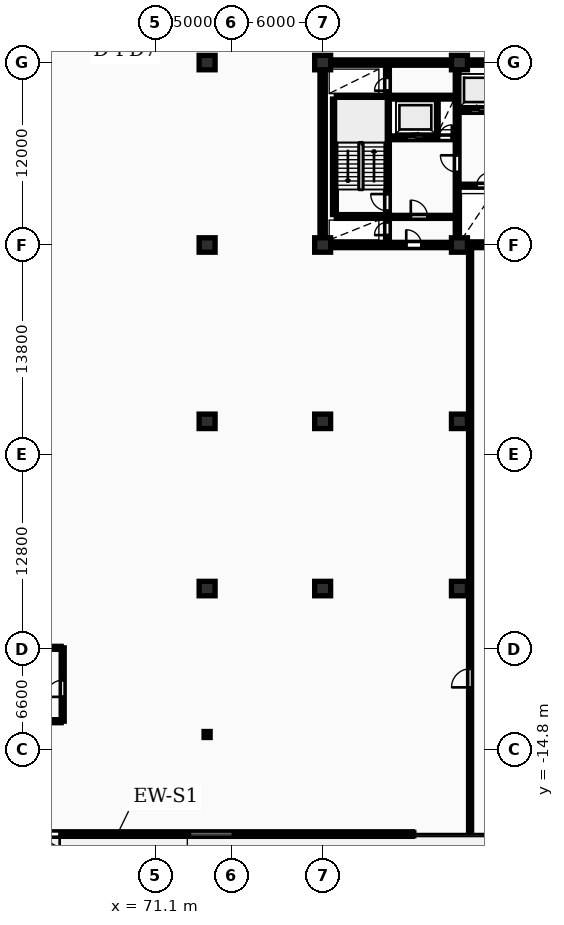
"""IFC4 building model, lengths in metres.
Left out: names, types, materials, properties, quantities, classifications, styles, units other than length and angle.
Written with IfcOpenShell. Run it as: python <this file> out.ifc"""

import sys

from ifc_helpers import new_model, si_unit, direction, frame, frame_2d, origin, origin_2d, place, context, subcontext, project, spatial, rectangle, i_section, extrude, element, fill, save


model = new_model("IFC4")
c1 = context("Model", 3, precision=1e-05, world=origin(), true_north=direction((0.0, 1.0)))
c2 = subcontext(c1, "Body", "Model", "MODEL_VIEW")
j1 = project(units=[si_unit("LENGTHUNIT", "METRE"), si_unit("PLANEANGLEUNIT", "RADIAN")], contexts=[c1])
p1 = place(None, origin())
s1 = spatial("IfcSite", under=j1, at=p1, CompositionType="ELEMENT")
p2 = place(p1, origin())
s2 = spatial("IfcBuilding", under=s1, at=p2, CompositionType="ELEMENT")
p3 = place(p2, frame((0.0, 0.0, 10.0)))
s3 = spatial("IfcBuildingStorey", under=s2, at=p3, CompositionType="ELEMENT", Elevation=10.0)
for number, where, z_axis, x_axis in (
    (1, (74.5, -4.2, 0.0), (0.0, 0.0, 1.0), (1.0, 0.0, 0.0)),
    (2, (74.5, 6.8, 0.0), (0.0, 0.0, 1.0), (1.0, 0.0, 0.0)),
    (3, (74.5, 18.4, 0.0), (0.0, 0.0, 1.0), (1.0, 0.0, 0.0)),
    (4, (74.5, 30.4, 0.0), (0.0, 0.0, 1.0), (1.0, 0.0, 0.0)),
    (5, (82.1, -4.2, 0.0), (0.0, 0.0, 1.0), (1.0, 0.0, 0.0)),
    (6, (82.1, 6.8, 0.0), (0.0, 0.0, 1.0), (1.0, 0.0, 0.0)),
    (7, (82.1, 18.4, 0.0), (0.0, 0.0, 1.0), (1.0, 0.0, 0.0)),
    (8, (82.1, 30.4, 0.0), (0.0, 0.0, 1.0), (1.0, 0.0, 0.0)),
    (9, (91.1, -4.2, 0.0), (0.0, 0.0, 1.0), (1.0, 0.0, 0.0)),
    (10, (91.1, 6.8, 0.0), (0.0, 0.0, 1.0), (1.0, 0.0, 0.0)),
    (11, (91.1, 18.4, 0.0), (0.0, 0.0, 1.0), (1.0, 0.0, 0.0)),
    (12, (91.1, 30.4, 0.0), (0.0, 0.0, 1.0), (1.0, 0.0, 0.0)),
):
    element("IfcColumn", number, at=place(p3, frame(where, z_axis=z_axis, x_axis=x_axis)), inside=s3, PredefinedType="COLUMN", context=c2, shape_type="SweptSolid", body=[
        extrude(rectangle(XDim=1.05, YDim=0.95, at=origin_2d()), origin(), (0.0, 0.0, 1.0), 4.5),
    ])
p4 = place(p3, frame((74.5, -13.8, 0.0), z_axis=(0.0, 0.0, 1.0), x_axis=(1.0, 0.0, 0.0)))
e13 = element("IfcColumn", 13, at=p4, inside=s3, PredefinedType="COLUMN", context=c2, shape_type="SweptSolid", body=[
    extrude(i_section(OverallWidth=0.399, OverallDepth=0.394, WebThickness=0.023, FlangeThickness=0.037, FilletRadius=0.015, at=origin_2d()), origin(), (0.0, 0.0, 1.0), 4.5),
])
p5 = place(p3, frame((49.2, -20.35, 0.0), z_axis=(0.0, 0.0, 1.0), x_axis=(1.0, 0.0, 0.0)))
e14 = element("IfcWall", 14, at=p5, inside=s3, PredefinedType="STANDARD", context=c2, shape_type="SweptSolid", body=[
    extrude(rectangle(XDim=38.8, YDim=0.3, at=frame_2d((19.4, 0.0))), origin(), (0.0, 0.0, 1.0), 4.2),
])
p6 = place(p5, frame((14.0, 0.0, 0.0)))
e15 = element("IfcOpeningElement", 15, at=p6, cuts=e14, PredefinedType="OPENING", context=c2, shape_type="SweptSolid", body=[
    extrude(rectangle(XDim=1.6, YDim=2.2, at=frame_2d((0.8, 1.1))), frame((0.0, 0.16, 0.0), z_axis=(0.0, -1.0, 0.0), x_axis=(1.0, 0.0, 0.0)), (0.0, 0.0, 1.0), 0.32),
])
p7 = place(p5, frame((24.0, 0.0, 0.9)))
e16 = element("IfcOpeningElement", 16, at=p7, cuts=e14, PredefinedType="OPENING", context=c2, shape_type="SweptSolid", body=[
    extrude(rectangle(XDim=3.0, YDim=2.6, at=frame_2d((1.5, 1.3))), frame((0.0, 0.16, 0.0), z_axis=(0.0, -1.0, 0.0), x_axis=(1.0, 0.0, 0.0)), (0.0, 0.0, 1.0), 0.32),
])
p8 = place(p3, frame((81.925, 30.4, 0.0), z_axis=(0.0, 0.0, 1.0), x_axis=(1.0, 0.0, 0.0)))
e17 = element("IfcWall", 17, at=p8, inside=s3, PredefinedType="SHEAR", context=c2, shape_type="SweptSolid", body=[
    extrude(rectangle(XDim=36.265, YDim=0.35, at=frame_2d((18.132, 0.0))), origin(), (0.0, 0.0, 1.0), 4.5),
])
p9 = place(p3, frame((82.1, 18.575, 0.0), z_axis=(0.0, 0.0, 1.0), x_axis=(0.0, 1.0, 0.0)))
e18 = element("IfcWall", 18, at=p9, inside=s3, PredefinedType="SHEAR", context=c2, shape_type="SweptSolid", body=[
    extrude(rectangle(XDim=11.65, YDim=0.35, at=frame_2d((5.825, 0.0))), origin(), (0.0, 0.0, 1.0), 4.5),
])
p10 = place(p3, frame((81.925, 18.4, 0.0), z_axis=(0.0, 0.0, 1.0), x_axis=(1.0, 0.0, 0.0)))
e19 = element("IfcWall", 19, at=p10, inside=s3, PredefinedType="SHEAR", context=c2, shape_type="SweptSolid", body=[
    extrude(rectangle(XDim=36.265, YDim=0.35, at=frame_2d((18.132, 0.0))), origin(), (0.0, 0.0, 1.0), 4.5),
])
p11 = place(p10, frame((5.675, 0.0, 0.0)))
e20 = element("IfcOpeningElement", 20, at=p11, cuts=e19, PredefinedType="OPENING", context=c2, shape_type="SweptSolid", body=[
    extrude(rectangle(XDim=1.0, YDim=2.15, at=frame_2d((0.5, 1.075))), frame((0.0, 0.185, 0.0), z_axis=(0.0, -1.0, 0.0), x_axis=(1.0, 0.0, 0.0)), (0.0, 0.0, 1.0), 0.37),
])
p12 = place(p10, frame((21.925, 0.0, 0.0)))
e21 = element("IfcOpeningElement", 21, at=p12, cuts=e19, PredefinedType="OPENING", context=c2, shape_type="SweptSolid", body=[
    extrude(rectangle(XDim=1.5, YDim=2.2, at=frame_2d((0.75, 1.1))), frame((0.0, 0.185, 0.0), z_axis=(0.0, -1.0, 0.0), x_axis=(1.0, 0.0, 0.0)), (0.0, 0.0, 1.0), 0.37),
])
p13 = place(p10, frame((29.875, 0.0, 0.0)))
e22 = element("IfcOpeningElement", 22, at=p13, cuts=e19, PredefinedType="OPENING", context=c2, shape_type="SweptSolid", body=[
    extrude(rectangle(XDim=1.0, YDim=2.15, at=frame_2d((0.5, 1.075))), frame((0.0, 0.185, 0.0), z_axis=(0.0, -1.0, 0.0), x_axis=(1.0, 0.0, 0.0)), (0.0, 0.0, 1.0), 0.37),
])
p14 = place(p3, frame((82.875, 20.4, 0.0), z_axis=(0.0, 0.0, 1.0), x_axis=(0.0, 1.0, 0.0)))
e23 = element("IfcWall", 23, at=p14, inside=s3, PredefinedType="SHEAR", context=c2, shape_type="SweptSolid", body=[
    extrude(rectangle(XDim=7.6, YDim=0.25, at=frame_2d((3.8, 0.0))), origin(), (0.0, 0.0, 1.0), 4.5),
])
p15 = place(p3, frame((86.365, 18.6, 0.0), z_axis=(0.0, 0.0, 1.0), x_axis=(0.0, 1.0, 0.0)))
e24 = element("IfcWall", 24, at=p15, inside=s3, PredefinedType="SHEAR", context=c2, shape_type="SweptSolid", body=[
    extrude(rectangle(XDim=11.6, YDim=0.25, at=frame_2d((5.8, 0.0))), origin(), (0.0, 0.0, 1.0), 4.5),
])
p16 = place(p15, frame((0.45, 0.0, 0.0)))
e25 = element("IfcOpeningElement", 25, at=p16, cuts=e24, PredefinedType="OPENING", context=c2, shape_type="SweptSolid", body=[
    extrude(rectangle(XDim=0.85, YDim=2.05, at=frame_2d((0.425, 1.025))), frame((0.0, 0.135, 0.0), z_axis=(0.0, -1.0, 0.0), x_axis=(1.0, 0.0, 0.0)), (0.0, 0.0, 1.0), 0.27),
])
p17 = place(p15, frame((2.05, 0.0, 0.0)))
e26 = element("IfcOpeningElement", 26, at=p17, cuts=e24, PredefinedType="OPENING", context=c2, shape_type="SweptSolid", body=[
    extrude(rectangle(XDim=1.1, YDim=2.1, at=frame_2d((0.55, 1.05))), frame((0.0, 0.135, 0.0), z_axis=(0.0, -1.0, 0.0), x_axis=(1.0, 0.0, 0.0)), (0.0, 0.0, 1.0), 0.27),
])
p18 = place(p15, frame((9.95, 0.0, 0.0)))
e27 = element("IfcOpeningElement", 27, at=p18, cuts=e24, PredefinedType="OPENING", context=c2, shape_type="SweptSolid", body=[
    extrude(rectangle(XDim=0.85, YDim=2.05, at=frame_2d((0.425, 1.025))), frame((0.0, 0.135, 0.0), z_axis=(0.0, -1.0, 0.0), x_axis=(1.0, 0.0, 0.0)), (0.0, 0.0, 1.0), 0.27),
])
p19 = place(p3, frame((83.0, 20.275, 0.0), z_axis=(0.0, 0.0, 1.0), x_axis=(1.0, 0.0, 0.0)))
e28 = element("IfcWall", 28, at=p19, inside=s3, PredefinedType="SHEAR", context=c2, shape_type="SweptSolid", body=[
    extrude(rectangle(XDim=3.24, YDim=0.25, at=frame_2d((1.62, 0.0))), origin(), (0.0, 0.0, 1.0), 4.5),
])
p20 = place(p3, frame((83.0, 28.125, 0.0), z_axis=(0.0, 0.0, 1.0), x_axis=(1.0, 0.0, 0.0)))
e29 = element("IfcWall", 29, at=p20, inside=s3, PredefinedType="SHEAR", context=c2, shape_type="SweptSolid", body=[
    extrude(rectangle(XDim=7.82, YDim=0.25, at=frame_2d((3.91, 0.0))), origin(), (0.0, 0.0, 1.0), 4.5),
])
p21 = place(p3, frame((86.5, 25.45, 0.0), z_axis=(0.0, 0.0, 1.0), x_axis=(1.0, 0.0, 0.0)))
e30 = element("IfcWall", 30, at=p21, inside=s3, PredefinedType="SHEAR", context=c2, shape_type="SweptSolid", body=[
    extrude(rectangle(XDim=4.32, YDim=0.25, at=frame_2d((2.16, 0.0))), origin(), (0.0, 0.0, 1.0), 4.5),
])
p22 = place(p21, frame((1.14, 0.0, 0.0)))
e31 = element("IfcOpeningElement", 31, at=p22, cuts=e30, PredefinedType="OPENING", context=c2, shape_type="SweptSolid", body=[
    extrude(rectangle(XDim=1.12, YDim=2.12, at=frame_2d((0.56, 1.06))), frame((0.0, 0.135, 0.0), z_axis=(0.0, -1.0, 0.0), x_axis=(1.0, 0.0, 0.0)), (0.0, 0.0, 1.0), 0.27),
])
p23 = place(p21, frame((3.25, 0.0, 0.0)))
e32 = element("IfcOpeningElement", 32, at=p23, cuts=e30, PredefinedType="OPENING", context=c2, shape_type="SweptSolid", body=[
    extrude(rectangle(XDim=0.85, YDim=2.05, at=frame_2d((0.425, 1.025))), frame((0.0, 0.135, 0.0), z_axis=(0.0, -1.0, 0.0), x_axis=(1.0, 0.0, 0.0)), (0.0, 0.0, 1.0), 0.27),
])
p24 = place(p3, frame((89.6, 25.58, 0.0), z_axis=(0.0, 0.0, 1.0), x_axis=(0.0, 1.0, 0.0)))
e33 = element("IfcWall", 33, at=p24, inside=s3, PredefinedType="PARTITIONING", context=c2, shape_type="SweptSolid", body=[
    extrude(rectangle(XDim=2.42, YDim=0.2, at=frame_2d((1.21, 0.0))), origin(), (0.0, 0.0, 1.0), 4.2),
])
p25 = place(p3, frame((86.5, 20.25, 0.0), z_axis=(0.0, 0.0, 1.0), x_axis=(1.0, 0.0, 0.0)))
e34 = element("IfcWall", 34, at=p25, inside=s3, PredefinedType="PARTITIONING", context=c2, shape_type="SweptSolid", body=[
    extrude(rectangle(XDim=4.32, YDim=0.2, at=frame_2d((2.16, 0.0))), origin(), (0.0, 0.0, 1.0), 4.2),
])
p26 = place(p25, frame((1.4, 0.0, 0.0)))
e35 = element("IfcOpeningElement", 35, at=p26, cuts=e34, PredefinedType="OPENING", context=c2, shape_type="SweptSolid", body=[
    extrude(rectangle(XDim=1.1, YDim=2.1, at=frame_2d((0.55, 1.05))), frame((0.0, 0.11, 0.0), z_axis=(0.0, -1.0, 0.0), x_axis=(1.0, 0.0, 0.0)), (0.0, 0.0, 1.0), 0.22),
])
p27 = place(p3, frame((90.95, 18.6, 0.0), z_axis=(0.0, 0.0, 1.0), x_axis=(0.0, 1.0, 0.0)))
e36 = element("IfcWall", 36, at=p27, inside=s3, PredefinedType="SHEAR", context=c2, shape_type="SweptSolid", body=[
    extrude(rectangle(XDim=11.6, YDim=0.25, at=frame_2d((5.8, 0.0))), origin(), (0.0, 0.0, 1.0), 4.5),
])
p28 = place(p27, frame((4.6, 0.0, 0.0)))
e37 = element("IfcOpeningElement", 37, at=p28, cuts=e36, PredefinedType="OPENING", context=c2, shape_type="SweptSolid", body=[
    extrude(rectangle(XDim=1.1, YDim=2.1, at=frame_2d((0.55, 1.05))), frame((0.0, 0.135, 0.0), z_axis=(0.0, -1.0, 0.0), x_axis=(1.0, 0.0, 0.0)), (0.0, 0.0, 1.0), 0.27),
])
p29 = place(p3, frame((91.08, 27.25, 0.0), z_axis=(0.0, 0.0, 1.0), x_axis=(1.0, 0.0, 0.0)))
e38 = element("IfcWall", 38, at=p29, inside=s3, PredefinedType="SHEAR", context=c2, shape_type="SweptSolid", body=[
    extrude(rectangle(XDim=8.34, YDim=0.25, at=frame_2d((4.17, 0.0))), origin(), (0.0, 0.0, 1.0), 4.5),
])
p30 = place(p29, frame((0.76, 0.0, 0.0)))
e39 = element("IfcOpeningElement", 39, at=p30, cuts=e38, PredefinedType="OPENING", context=c2, shape_type="SweptSolid", body=[
    extrude(rectangle(XDim=1.12, YDim=2.12, at=frame_2d((0.56, 1.06))), frame((0.0, 0.135, 0.0), z_axis=(0.0, -1.0, 0.0), x_axis=(1.0, 0.0, 0.0)), (0.0, 0.0, 1.0), 0.27),
])
p31 = place(p29, frame((3.56, 0.0, 0.0)))
e40 = element("IfcOpeningElement", 40, at=p31, cuts=e38, PredefinedType="OPENING", context=c2, shape_type="SweptSolid", body=[
    extrude(rectangle(XDim=1.12, YDim=2.12, at=frame_2d((0.56, 1.06))), frame((0.0, 0.135, 0.0), z_axis=(0.0, -1.0, 0.0), x_axis=(1.0, 0.0, 0.0)), (0.0, 0.0, 1.0), 0.27),
])
p32 = place(p29, frame((6.36, 0.0, 0.0)))
e41 = element("IfcOpeningElement", 41, at=p32, cuts=e38, PredefinedType="OPENING", context=c2, shape_type="SweptSolid", body=[
    extrude(rectangle(XDim=1.12, YDim=2.12, at=frame_2d((0.56, 1.06))), frame((0.0, 0.135, 0.0), z_axis=(0.0, -1.0, 0.0), x_axis=(1.0, 0.0, 0.0)), (0.0, 0.0, 1.0), 0.27),
])
p33 = place(p3, frame((91.08, 22.3, 0.0), z_axis=(0.0, 0.0, 1.0), x_axis=(1.0, 0.0, 0.0)))
e42 = element("IfcWall", 42, at=p33, inside=s3, PredefinedType="PARTITIONING", context=c2, shape_type="SweptSolid", body=[
    extrude(rectangle(XDim=19.14, YDim=0.2, at=frame_2d((9.57, 0.0))), origin(), (0.0, 0.0, 1.0), 4.2),
])
p34 = place(p33, frame((1.15, 0.0, 0.0)))
e43 = element("IfcOpeningElement", 43, at=p34, cuts=e42, PredefinedType="OPENING", context=c2, shape_type="SweptSolid", body=[
    extrude(rectangle(XDim=0.85, YDim=2.05, at=frame_2d((0.425, 1.025))), frame((0.0, 0.11, 0.0), z_axis=(0.0, -1.0, 0.0), x_axis=(1.0, 0.0, 0.0)), (0.0, 0.0, 1.0), 0.22),
])
p35 = place(p33, frame((3.2, 0.0, 0.0)))
e44 = element("IfcOpeningElement", 44, at=p35, cuts=e42, PredefinedType="OPENING", context=c2, shape_type="SweptSolid", body=[
    extrude(rectangle(XDim=0.85, YDim=2.05, at=frame_2d((0.425, 1.025))), frame((0.0, 0.11, 0.0), z_axis=(0.0, -1.0, 0.0), x_axis=(1.0, 0.0, 0.0)), (0.0, 0.0, 1.0), 0.22),
])
p36 = place(p33, frame((12.72, 0.0, 0.0)))
e45 = element("IfcOpeningElement", 45, at=p36, cuts=e42, PredefinedType="OPENING", context=c2, shape_type="SweptSolid", body=[
    extrude(rectangle(XDim=1.5, YDim=2.2, at=frame_2d((0.75, 1.1))), frame((0.0, 0.11, 0.0), z_axis=(0.0, -1.0, 0.0), x_axis=(1.0, 0.0, 0.0)), (0.0, 0.0, 1.0), 0.22),
])
p37 = place(p33, frame((6.42, 0.0, 0.0)))
e46 = element("IfcOpeningElement", 46, at=p37, cuts=e42, PredefinedType="OPENING", context=c2, shape_type="SweptSolid", body=[
    extrude(rectangle(XDim=0.92, YDim=2.08, at=frame_2d((0.46, 1.04))), frame((0.0, 0.11, 0.0), z_axis=(0.0, -1.0, 0.0), x_axis=(1.0, 0.0, 0.0)), (0.0, 0.0, 1.0), 0.22),
])
p38 = place(p33, frame((15.87, 0.0, 0.0)))
e47 = element("IfcOpeningElement", 47, at=p38, cuts=e42, PredefinedType="OPENING", context=c2, shape_type="SweptSolid", body=[
    extrude(rectangle(XDim=0.92, YDim=2.08, at=frame_2d((0.46, 1.04))), frame((0.0, 0.11, 0.0), z_axis=(0.0, -1.0, 0.0), x_axis=(1.0, 0.0, 0.0)), (0.0, 0.0, 1.0), 0.22),
])
p39 = place(p3, frame((65.0, -12.925, 0.0), z_axis=(0.0, 0.0, 1.0), x_axis=(0.0, 1.0, 0.0)))
e48 = element("IfcWall", 48, at=p39, inside=s3, PredefinedType="PARTITIONING", context=c2, shape_type="SweptSolid", body=[
    extrude(rectangle(XDim=4.825, YDim=0.2, at=frame_2d((2.413, 0.0))), origin(), (0.0, 0.0, 1.0), 4.2),
])
p40 = place(p39, frame((1.6, 0.0, 0.0)))
e49 = element("IfcOpeningElement", 49, at=p40, cuts=e48, PredefinedType="OPENING", context=c2, shape_type="SweptSolid", body=[
    extrude(rectangle(XDim=1.1, YDim=2.15, at=frame_2d((0.55, 1.075))), frame((0.0, 0.11, 0.0), z_axis=(0.0, -1.0, 0.0), x_axis=(1.0, 0.0, 0.0)), (0.0, 0.0, 1.0), 0.22),
])
for number, where, z_axis, x_axis in (
    (50, (61.5, -12.925, 0.0), (0.0, 0.0, 1.0), (1.0, 0.0, 0.0)),
    (51, (61.5, -8.1, 0.0), (0.0, 0.0, 1.0), (1.0, 0.0, 0.0)),
):
    element("IfcWall", number, at=place(p3, frame(where, z_axis=z_axis, x_axis=x_axis)), inside=s3, PredefinedType="PARTITIONING", context=c2, shape_type="SweptSolid", body=[
        extrude(rectangle(XDim=3.4, YDim=0.2, at=frame_2d((1.7, 0.0))), origin(), (0.0, 0.0, 1.0), 4.2),
    ])
p41 = place(p3, frame((91.8, -20.2, 0.0), z_axis=(0.0, 0.0, 1.0), x_axis=(0.0, 1.0, 0.0)))
e52 = element("IfcWall", 52, at=p41, inside=s3, PredefinedType="PARTITIONING", context=c2, shape_type="SweptSolid", body=[
    extrude(rectangle(XDim=38.45, YDim=0.2, at=frame_2d((19.225, 0.0))), origin(), (0.0, 0.0, 1.0), 4.2),
])
p42 = place(p41, frame((9.5, 0.0, 0.0)))
e53 = element("IfcOpeningElement", 53, at=p42, cuts=e52, PredefinedType="OPENING", context=c2, shape_type="SweptSolid", body=[
    extrude(rectangle(XDim=1.22, YDim=2.18, at=frame_2d((0.61, 1.09))), frame((0.0, 0.11, 0.0), z_axis=(0.0, -1.0, 0.0), x_axis=(1.0, 0.0, 0.0)), (0.0, 0.0, 1.0), 0.22),
])
p43 = place(p6, frame((1.6, 0.0, 0.0), z_axis=(0.0, 0.0, 1.0), x_axis=(-1.0, 0.0, 0.0)))
e54 = element("IfcDoor", 54, at=p43, inside=s3, OperationType="DOUBLE_DOOR_SINGLE_SWING", PredefinedType="DOOR", context=c2, shape_type="SweptSolid", body=[
    extrude(rectangle(XDim=1.6, YDim=2.2, at=frame_2d((0.8, 1.1))), frame((0.0, 0.025, 0.0), z_axis=(0.0, -1.0, 0.0), x_axis=(1.0, 0.0, 0.0)), (0.0, 0.0, 1.0), 0.05),
])
fill(e15, e54)
p44 = place(p7, origin())
e55 = element("IfcWindow", 55, at=p44, inside=s3, PartitioningType="TRIPLE_PANEL_VERTICAL", PredefinedType="WINDOW", context=c2, shape_type="SweptSolid", body=[
    extrude(rectangle(XDim=3.0, YDim=2.6, at=frame_2d((1.5, 1.3))), frame((0.0, 0.03, 0.0), z_axis=(0.0, -1.0, 0.0), x_axis=(1.0, 0.0, 0.0)), (0.0, 0.0, 1.0), 0.06),
])
fill(e16, e55)
p45 = place(p11, origin())
e56 = element("IfcDoor", 56, at=p45, inside=s3, OperationType="SINGLE_SWING_LEFT", PredefinedType="DOOR", context=c2, shape_type="SweptSolid", body=[
    extrude(rectangle(XDim=1.0, YDim=2.15, at=frame_2d((0.5, 1.075))), frame((0.0, 0.025, 0.0), z_axis=(0.0, -1.0, 0.0), x_axis=(1.0, 0.0, 0.0)), (0.0, 0.0, 1.0), 0.05),
])
fill(e20, e56)
p46 = place(p16, origin())
e57 = element("IfcDoor", 57, at=p46, inside=s3, OperationType="SINGLE_SWING_LEFT", PredefinedType="DOOR", context=c2, shape_type="SweptSolid", body=[
    extrude(rectangle(XDim=0.85, YDim=2.05, at=frame_2d((0.425, 1.025))), frame((0.0, 0.025, 0.0), z_axis=(0.0, -1.0, 0.0), x_axis=(1.0, 0.0, 0.0)), (0.0, 0.0, 1.0), 0.05),
])
fill(e25, e57)
p47 = place(p17, origin())
e58 = element("IfcDoor", 58, at=p47, inside=s3, OperationType="SINGLE_SWING_RIGHT", PredefinedType="DOOR", context=c2, shape_type="SweptSolid", body=[
    extrude(rectangle(XDim=1.1, YDim=2.1, at=frame_2d((0.55, 1.05))), frame((0.0, 0.025, 0.0), z_axis=(0.0, -1.0, 0.0), x_axis=(1.0, 0.0, 0.0)), (0.0, 0.0, 1.0), 0.05),
])
fill(e26, e58)
p48 = place(p18, origin())
e59 = element("IfcDoor", 59, at=p48, inside=s3, OperationType="SINGLE_SWING_LEFT", PredefinedType="DOOR", context=c2, shape_type="SweptSolid", body=[
    extrude(rectangle(XDim=0.85, YDim=2.05, at=frame_2d((0.425, 1.025))), frame((0.0, 0.025, 0.0), z_axis=(0.0, -1.0, 0.0), x_axis=(1.0, 0.0, 0.0)), (0.0, 0.0, 1.0), 0.05),
])
fill(e27, e59)
p49 = place(p22, origin())
e60 = element("IfcDoor", 60, at=p49, inside=s3, OperationType="SLIDING_TO_RIGHT", PredefinedType="DOOR", context=c2, shape_type="SweptSolid", body=[
    extrude(rectangle(XDim=1.12, YDim=2.12, at=frame_2d((0.56, 1.06))), frame((0.0, 0.025, 0.0), z_axis=(0.0, -1.0, 0.0), x_axis=(1.0, 0.0, 0.0)), (0.0, 0.0, 1.0), 0.05),
])
fill(e31, e60)
p50 = place(p23, origin())
e61 = element("IfcDoor", 61, at=p50, inside=s3, OperationType="SINGLE_SWING_RIGHT", PredefinedType="DOOR", context=c2, shape_type="SweptSolid", body=[
    extrude(rectangle(XDim=0.85, YDim=2.05, at=frame_2d((0.425, 1.025))), frame((0.0, 0.025, 0.0), z_axis=(0.0, -1.0, 0.0), x_axis=(1.0, 0.0, 0.0)), (0.0, 0.0, 1.0), 0.05),
])
fill(e32, e61)
p51 = place(p26, origin())
e62 = element("IfcDoor", 62, at=p51, inside=s3, OperationType="SINGLE_SWING_LEFT", PredefinedType="DOOR", context=c2, shape_type="SweptSolid", body=[
    extrude(rectangle(XDim=1.1, YDim=2.1, at=frame_2d((0.55, 1.05))), frame((0.0, 0.025, 0.0), z_axis=(0.0, -1.0, 0.0), x_axis=(1.0, 0.0, 0.0)), (0.0, 0.0, 1.0), 0.05),
])
fill(e35, e62)
p52 = place(p28, origin())
e63 = element("IfcDoor", 63, at=p52, inside=s3, OperationType="SINGLE_SWING_RIGHT", PredefinedType="DOOR", context=c2, shape_type="SweptSolid", body=[
    extrude(rectangle(XDim=1.1, YDim=2.1, at=frame_2d((0.55, 1.05))), frame((0.0, 0.025, 0.0), z_axis=(0.0, -1.0, 0.0), x_axis=(1.0, 0.0, 0.0)), (0.0, 0.0, 1.0), 0.05),
])
fill(e37, e63)
p53 = place(p30, origin())
e64 = element("IfcDoor", 64, at=p53, inside=s3, OperationType="SLIDING_TO_LEFT", PredefinedType="DOOR", context=c2, shape_type="SweptSolid", body=[
    extrude(rectangle(XDim=1.12, YDim=2.12, at=frame_2d((0.56, 1.06))), frame((0.0, 0.025, 0.0), z_axis=(0.0, -1.0, 0.0), x_axis=(1.0, 0.0, 0.0)), (0.0, 0.0, 1.0), 0.05),
])
fill(e39, e64)
p54 = place(p34, origin())
e65 = element("IfcDoor", 65, at=p54, inside=s3, OperationType="SINGLE_SWING_RIGHT", PredefinedType="DOOR", context=c2, shape_type="SweptSolid", body=[
    extrude(rectangle(XDim=0.85, YDim=2.05, at=frame_2d((0.425, 1.025))), frame((0.0, 0.025, 0.0), z_axis=(0.0, -1.0, 0.0), x_axis=(1.0, 0.0, 0.0)), (0.0, 0.0, 1.0), 0.05),
])
fill(e43, e65)
p55 = place(p40, origin())
e66 = element("IfcDoor", 66, at=p55, inside=s3, OperationType="SINGLE_SWING_LEFT", PredefinedType="DOOR", context=c2, shape_type="SweptSolid", body=[
    extrude(rectangle(XDim=1.1, YDim=2.15, at=frame_2d((0.55, 1.075))), frame((0.0, 0.025, 0.0), z_axis=(0.0, -1.0, 0.0), x_axis=(1.0, 0.0, 0.0)), (0.0, 0.0, 1.0), 0.05),
])
fill(e49, e66)
p56 = place(p42, origin())
e67 = element("IfcDoor", 67, at=p56, inside=s3, OperationType="SINGLE_SWING_LEFT", PredefinedType="DOOR", context=c2, shape_type="SweptSolid", body=[
    extrude(rectangle(XDim=1.22, YDim=2.18, at=frame_2d((0.61, 1.09))), frame((0.0, 0.025, 0.0), z_axis=(0.0, -1.0, 0.0), x_axis=(1.0, 0.0, 0.0)), (0.0, 0.0, 1.0), 0.05),
])
fill(e53, e67)
save(model, sys.argv[1])
